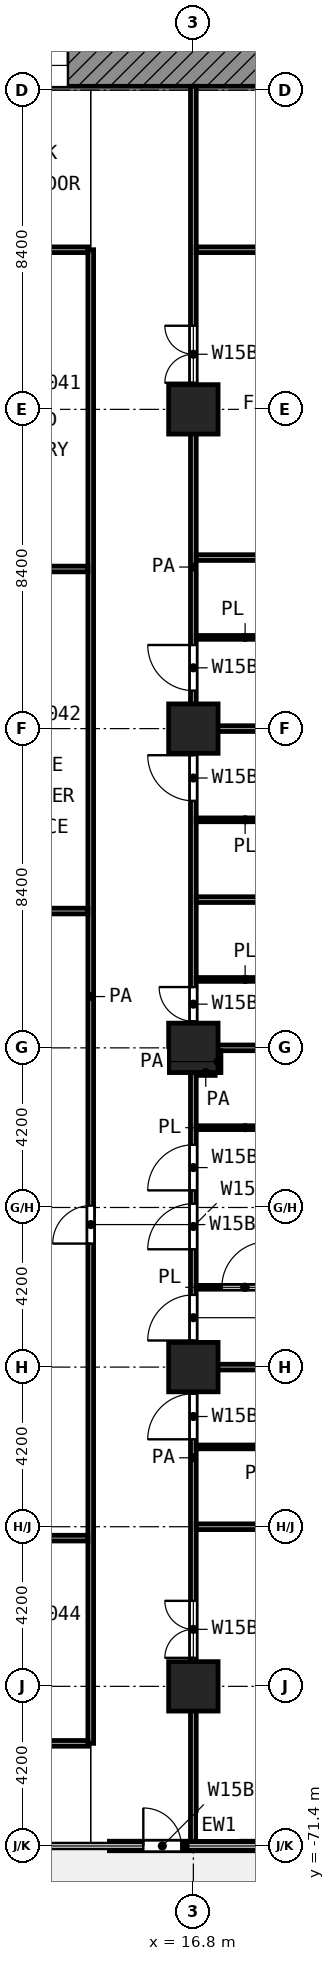
"""IFC4 building model, lengths in metres.
Left out: names, types, materials, properties, quantities, classifications, styles, units other than length and angle.
Written with IfcOpenShell. Run it as: python <this file> out.ifc"""

import sys

from ifc_helpers import new_model, si_unit, direction, frame, frame_2d, origin, origin_2d, place, context, subcontext, project, spatial, rectangle, extrude, element, fill, save


model = new_model("IFC4")
c1 = context("Model", 3, precision=1e-05, world=origin(), true_north=direction((0.0, 1.0)))
c2 = subcontext(c1, "Body", "Model", "MODEL_VIEW")
j1 = project(units=[si_unit("LENGTHUNIT", "METRE"), si_unit("PLANEANGLEUNIT", "RADIAN")], contexts=[c1])
p1 = place(None, origin())
s1 = spatial("IfcSite", under=j1, at=p1, CompositionType="ELEMENT")
p2 = place(p1, origin())
s2 = spatial("IfcBuilding", under=s1, at=p2, CompositionType="ELEMENT")
p3 = place(p2, frame((0.0, 0.0, 85.4)))
s3 = spatial("IfcBuildingStorey", under=s2, at=p3, CompositionType="ELEMENT", Elevation=85.4)
for number, where, z_axis, x_axis in (
    (1, (16.8, -33.6, 0.0), (0.0, 0.0, 1.0), (1.0, 0.0, 0.0)),
    (2, (16.8, -42.0, 0.0), (0.0, 0.0, 1.0), (1.0, 0.0, 0.0)),
    (3, (16.8, -50.4, 0.0), (0.0, 0.0, 1.0), (1.0, 0.0, 0.0)),
    (4, (16.8, -58.8, 0.0), (0.0, 0.0, 1.0), (1.0, 0.0, 0.0)),
    (5, (16.8, -67.2, 0.0), (0.0, 0.0, 1.0), (1.0, 0.0, 0.0)),
):
    element("IfcColumn", number, at=place(p3, frame(where, z_axis=z_axis, x_axis=x_axis)), inside=s3, PredefinedType="COLUMN", context=c2, shape_type="SweptSolid", body=[
        extrude(rectangle(XDim=1.3, YDim=1.3, at=origin_2d()), origin(), (0.0, 0.0, 1.0), 4.2),
    ])
p4 = place(p3, frame((14.592, -71.4, 0.0), z_axis=(0.0, 0.0, 1.0), x_axis=(1.0, 0.0, 0.0)))
e6 = element("IfcWall", 6, at=p4, inside=s3, PredefinedType="SOLIDWALL", context=c2, shape_type="SweptSolid", body=[
    extrude(rectangle(XDim=3.983, YDim=0.25, at=frame_2d((1.992, 0.0))), origin(), (0.0, 0.0, 1.0), 3.78),
])
p5 = place(p4, frame((0.892, 0.0, 0.0)))
e7 = element("IfcOpeningElement", 7, at=p5, cuts=e6, PredefinedType="OPENING", context=c2, shape_type="SweptSolid", body=[
    extrude(rectangle(XDim=1.0, YDim=2.1, at=frame_2d((0.5, 1.05))), frame((0.0, 0.135, 0.0), z_axis=(0.0, -1.0, 0.0), x_axis=(1.0, 0.0, 0.0)), (0.0, 0.0, 1.0), 0.27),
])
p6 = place(p3, frame((5.4, -24.55, 0.0), z_axis=(0.0, 0.0, 1.0), x_axis=(1.0, 0.0, 0.0)))
e8 = element("IfcWall", 8, at=p6, inside=s3, PredefinedType="SHEAR", context=c2, shape_type="SweptSolid", body=[
    extrude(rectangle(XDim=18.6, YDim=1.1, at=frame_2d((9.3, 0.0))), origin(), (0.0, 0.0, 1.0), 3.9),
])
p7 = place(p6, frame((6.3, 0.0, 0.0)))
e9 = element("IfcOpeningElement", 9, at=p7, cuts=e8, PredefinedType="OPENING", context=c2, shape_type="SweptSolid", body=[
    extrude(rectangle(XDim=1.8, YDim=2.1, at=frame_2d((0.9, 1.05))), frame((0.0, 0.56, 0.0), z_axis=(0.0, -1.0, 0.0), x_axis=(1.0, 0.0, 0.0)), (0.0, 0.0, 1.0), 1.12),
])
p8 = place(p3, frame((16.875, -60.9, 0.0), z_axis=(0.0, 0.0, 1.0), x_axis=(1.0, 0.0, 0.0)))
e10 = element("IfcWall", 10, at=p8, inside=s3, PredefinedType="PARTITIONING", context=c2, shape_type="SweptSolid", body=[
    extrude(rectangle(XDim=3.175, YDim=0.1, at=frame_2d((1.587, 0.0))), origin(), (0.0, 0.0, 1.0), 3.9),
])
p9 = place(p3, frame((16.875, -56.7, 0.0), z_axis=(0.0, 0.0, 1.0), x_axis=(1.0, 0.0, 0.0)))
e11 = element("IfcWall", 11, at=p9, inside=s3, PredefinedType="PARTITIONING", context=c2, shape_type="SweptSolid", body=[
    extrude(rectangle(XDim=2.575, YDim=0.1, at=frame_2d((1.288, 0.0))), origin(), (0.0, 0.0, 1.0), 3.9),
])
p10 = place(p9, frame((0.675, 0.0, 0.0)))
e12 = element("IfcOpeningElement", 12, at=p10, cuts=e11, PredefinedType="OPENING", context=c2, shape_type="SweptSolid", body=[
    extrude(rectangle(XDim=1.2, YDim=2.1, at=frame_2d((0.6, 1.05))), frame((0.0, 0.06, 0.0), z_axis=(0.0, -1.0, 0.0), x_axis=(1.0, 0.0, 0.0)), (0.0, 0.0, 1.0), 0.12),
])
for number, where, z_axis, x_axis in (
    (13, (16.875, -52.5, 0.0), (0.0, 0.0, 1.0), (1.0, 0.0, 0.0)),
    (14, (16.875, -48.6, 0.0), (0.0, 0.0, 1.0), (1.0, 0.0, 0.0)),
    (15, (16.875, -44.4, 0.0), (0.0, 0.0, 1.0), (1.0, 0.0, 0.0)),
    (16, (16.875, -39.6, 0.0), (0.0, 0.0, 1.0), (1.0, 0.0, 0.0)),
):
    element("IfcWall", number, at=place(p3, frame(where, z_axis=z_axis, x_axis=x_axis)), inside=s3, PredefinedType="PARTITIONING", context=c2, shape_type="SweptSolid", body=[
        extrude(rectangle(XDim=2.575, YDim=0.1, at=frame_2d((1.288, 0.0))), origin(), (0.0, 0.0, 1.0), 3.9),
    ])
for number, where, z_axis, x_axis in (
    (17, (11.175, -68.7, 0.0), (0.0, 0.0, 1.0), (1.0, 0.0, 0.0)),
    (18, (11.175, -63.3, 0.0), (0.0, 0.0, 1.0), (1.0, 0.0, 0.0)),
):
    element("IfcWall", number, at=place(p3, frame(where, z_axis=z_axis, x_axis=x_axis)), inside=s3, PredefinedType="PARTITIONING", context=c2, shape_type="SweptSolid", body=[
        extrude(rectangle(XDim=2.85, YDim=0.15, at=frame_2d((1.425, 0.0))), origin(), (0.0, 0.0, 1.0), 3.9),
    ])
for number, where, z_axis, x_axis in (
    (19, (16.875, -63.0, 0.0), (0.0, 0.0, 1.0), (1.0, 0.0, 0.0)),
    (20, (16.875, -58.8, 0.0), (0.0, 0.0, 1.0), (1.0, 0.0, 0.0)),
):
    element("IfcWall", number, at=place(p3, frame(where, z_axis=z_axis, x_axis=x_axis)), inside=s3, PredefinedType="PARTITIONING", context=c2, shape_type="SweptSolid", body=[
        extrude(rectangle(XDim=8.245, YDim=0.15, at=frame_2d((4.123, 0.0))), origin(), (0.0, 0.0, 1.0), 3.9),
    ])
p11 = place(p3, frame((16.877, -51.05, 0.0), z_axis=(0.0, 0.0, 1.0), x_axis=(1.0, 0.0, 0.0)))
e21 = element("IfcWall", 21, at=p11, inside=s3, PredefinedType="PARTITIONING", context=c2, shape_type="SweptSolid", body=[
    extrude(rectangle(XDim=0.498, YDim=0.15, at=frame_2d((0.249, 0.0))), origin(), (0.0, 0.0, 1.0), 3.9),
])
p12 = place(p3, frame((16.877, -50.4, 0.0), z_axis=(0.0, 0.0, 1.0), x_axis=(1.0, 0.0, 0.0)))
e22 = element("IfcWall", 22, at=p12, inside=s3, PredefinedType="PARTITIONING", context=c2, shape_type="SweptSolid", body=[
    extrude(rectangle(XDim=8.243, YDim=0.15, at=frame_2d((4.122, 0.0))), origin(), (0.0, 0.0, 1.0), 3.9),
])
p13 = place(p3, frame((11.175, -46.8, 0.0), z_axis=(0.0, 0.0, 1.0), x_axis=(1.0, 0.0, 0.0)))
e23 = element("IfcWall", 23, at=p13, inside=s3, PredefinedType="PARTITIONING", context=c2, shape_type="SweptSolid", body=[
    extrude(rectangle(XDim=2.85, YDim=0.15, at=frame_2d((1.425, 0.0))), origin(), (0.0, 0.0, 1.0), 3.9),
])
for number, where, z_axis, x_axis in (
    (24, (16.875, -46.5, 0.0), (0.0, 0.0, 1.0), (1.0, 0.0, 0.0)),
    (25, (16.875, -42.0, 0.0), (0.0, 0.0, 1.0), (1.0, 0.0, 0.0)),
):
    element("IfcWall", number, at=place(p3, frame(where, z_axis=z_axis, x_axis=x_axis)), inside=s3, PredefinedType="PARTITIONING", context=c2, shape_type="SweptSolid", body=[
        extrude(rectangle(XDim=8.245, YDim=0.15, at=frame_2d((4.123, 0.0))), origin(), (0.0, 0.0, 1.0), 3.9),
    ])
p14 = place(p3, frame((11.175, -37.8, 0.0), z_axis=(0.0, 0.0, 1.0), x_axis=(1.0, 0.0, 0.0)))
e26 = element("IfcWall", 26, at=p14, inside=s3, PredefinedType="PARTITIONING", context=c2, shape_type="SweptSolid", body=[
    extrude(rectangle(XDim=2.85, YDim=0.15, at=frame_2d((1.425, 0.0))), origin(), (0.0, 0.0, 1.0), 3.9),
])
p15 = place(p3, frame((16.875, -37.5, 0.0), z_axis=(0.0, 0.0, 1.0), x_axis=(1.0, 0.0, 0.0)))
e27 = element("IfcWall", 27, at=p15, inside=s3, PredefinedType="PARTITIONING", context=c2, shape_type="SweptSolid", body=[
    extrude(rectangle(XDim=8.245, YDim=0.15, at=frame_2d((4.123, 0.0))), origin(), (0.0, 0.0, 1.0), 3.9),
])
p16 = place(p3, frame((11.175, -29.4, 0.0), z_axis=(0.0, 0.0, 1.0), x_axis=(1.0, 0.0, 0.0)))
e28 = element("IfcWall", 28, at=p16, inside=s3, PredefinedType="PARTITIONING", context=c2, shape_type="SweptSolid", body=[
    extrude(rectangle(XDim=2.85, YDim=0.15, at=frame_2d((1.425, 0.0))), origin(), (0.0, 0.0, 1.0), 3.9),
])
p17 = place(p3, frame((16.875, -29.4, 0.0), z_axis=(0.0, 0.0, 1.0), x_axis=(1.0, 0.0, 0.0)))
e29 = element("IfcWall", 29, at=p17, inside=s3, PredefinedType="PARTITIONING", context=c2, shape_type="SweptSolid", body=[
    extrude(rectangle(XDim=8.25, YDim=0.15, at=frame_2d((4.125, 0.0))), origin(), (0.0, 0.0, 1.0), 3.9),
])
p18 = place(p3, frame((14.1, -68.7, 0.0), z_axis=(0.0, 0.0, 1.0), x_axis=(0.0, 1.0, 0.0)))
e30 = element("IfcWall", 30, at=p18, inside=s3, PredefinedType="PARTITIONING", context=c2, shape_type="SweptSolid", body=[
    extrude(rectangle(XDim=39.3, YDim=0.15, at=frame_2d((19.65, 0.0))), origin(), (0.0, 0.0, 1.0), 3.9),
])
p19 = place(p18, frame((13.15, 0.0, 0.0)))
e31 = element("IfcOpeningElement", 31, at=p19, cuts=e30, PredefinedType="OPENING", context=c2, shape_type="SweptSolid", body=[
    extrude(rectangle(XDim=1.0, YDim=2.1, at=frame_2d((0.5, 1.05))), frame((0.0, 0.085, 0.0), z_axis=(0.0, -1.0, 0.0), x_axis=(1.0, 0.0, 0.0)), (0.0, 0.0, 1.0), 0.17),
])
p20 = place(p3, frame((16.8, -71.32, 0.0), z_axis=(0.0, 0.0, 1.0), x_axis=(0.0, 1.0, 0.0)))
e32 = element("IfcWall", 32, at=p20, inside=s3, PredefinedType="PARTITIONING", context=c2, shape_type="SweptSolid", body=[
    extrude(rectangle(XDim=20.268, YDim=0.15, at=frame_2d((10.134, 0.0))), origin(), (0.0, 0.0, 1.0), 3.9),
])
p21 = place(p20, frame((17.17, 0.0, 0.0)))
e33 = element("IfcOpeningElement", 33, at=p21, cuts=e32, PredefinedType="OPENING", context=c2, shape_type="SweptSolid", body=[
    extrude(rectangle(XDim=1.2, YDim=2.1, at=frame_2d((0.6, 1.05))), frame((0.0, 0.085, 0.0), z_axis=(0.0, -1.0, 0.0), x_axis=(1.0, 0.0, 0.0)), (0.0, 0.0, 1.0), 0.17),
])
p22 = place(p20, frame((15.62, 0.0, 0.0)))
e34 = element("IfcOpeningElement", 34, at=p22, cuts=e32, PredefinedType="OPENING", context=c2, shape_type="SweptSolid", body=[
    extrude(rectangle(XDim=1.2, YDim=2.1, at=frame_2d((0.6, 1.05))), frame((0.0, 0.085, 0.0), z_axis=(0.0, -1.0, 0.0), x_axis=(1.0, 0.0, 0.0)), (0.0, 0.0, 1.0), 0.17),
])
p23 = place(p20, frame((13.22, 0.0, 0.0)))
e35 = element("IfcOpeningElement", 35, at=p23, cuts=e32, PredefinedType="OPENING", context=c2, shape_type="SweptSolid", body=[
    extrude(rectangle(XDim=1.2, YDim=2.1, at=frame_2d((0.6, 1.05))), frame((0.0, 0.085, 0.0), z_axis=(0.0, -1.0, 0.0), x_axis=(1.0, 0.0, 0.0)), (0.0, 0.0, 1.0), 0.17),
])
p24 = place(p20, frame((10.62, 0.0, 0.0)))
e36 = element("IfcOpeningElement", 36, at=p24, cuts=e32, PredefinedType="OPENING", context=c2, shape_type="SweptSolid", body=[
    extrude(rectangle(XDim=1.2, YDim=2.1, at=frame_2d((0.6, 1.05))), frame((0.0, 0.085, 0.0), z_axis=(0.0, -1.0, 0.0), x_axis=(1.0, 0.0, 0.0)), (0.0, 0.0, 1.0), 0.17),
])
p25 = place(p20, frame((4.87, 0.0, 0.0)))
e37 = element("IfcOpeningElement", 37, at=p25, cuts=e32, PredefinedType="OPENING", context=c2, shape_type="SweptSolid", body=[
    extrude(rectangle(XDim=1.5, YDim=2.1, at=frame_2d((0.75, 1.05))), frame((0.0, 0.085, 0.0), z_axis=(0.0, -1.0, 0.0), x_axis=(1.0, 0.0, 0.0)), (0.0, 0.0, 1.0), 0.17),
])
p26 = place(p3, frame((16.8, -50.398, 0.0), z_axis=(0.0, 0.0, 1.0), x_axis=(0.0, 1.0, 0.0)))
e38 = element("IfcWall", 38, at=p26, inside=s3, PredefinedType="PARTITIONING", context=c2, shape_type="SweptSolid", body=[
    extrude(rectangle(XDim=25.298, YDim=0.15, at=frame_2d((12.649, 0.0))), origin(), (0.0, 0.0, 1.0), 3.9),
])
p27 = place(p26, frame((17.498, 0.0, 0.0)))
e39 = element("IfcOpeningElement", 39, at=p27, cuts=e38, PredefinedType="OPENING", context=c2, shape_type="SweptSolid", body=[
    extrude(rectangle(XDim=1.5, YDim=2.1, at=frame_2d((0.75, 1.05))), frame((0.0, 0.085, 0.0), z_axis=(0.0, -1.0, 0.0), x_axis=(1.0, 0.0, 0.0)), (0.0, 0.0, 1.0), 0.17),
])
p28 = place(p26, frame((9.398, 0.0, 0.0)))
e40 = element("IfcOpeningElement", 40, at=p28, cuts=e38, PredefinedType="OPENING", context=c2, shape_type="SweptSolid", body=[
    extrude(rectangle(XDim=1.2, YDim=2.1, at=frame_2d((0.6, 1.05))), frame((0.0, 0.085, 0.0), z_axis=(0.0, -1.0, 0.0), x_axis=(1.0, 0.0, 0.0)), (0.0, 0.0, 1.0), 0.17),
])
p29 = place(p26, frame((6.498, 0.0, 0.0)))
e41 = element("IfcOpeningElement", 41, at=p29, cuts=e38, PredefinedType="OPENING", context=c2, shape_type="SweptSolid", body=[
    extrude(rectangle(XDim=1.2, YDim=2.1, at=frame_2d((0.6, 1.05))), frame((0.0, 0.085, 0.0), z_axis=(0.0, -1.0, 0.0), x_axis=(1.0, 0.0, 0.0)), (0.0, 0.0, 1.0), 0.17),
])
p30 = place(p26, frame((0.698, 0.0, 0.0)))
e42 = element("IfcOpeningElement", 42, at=p30, cuts=e38, PredefinedType="OPENING", context=c2, shape_type="SweptSolid", body=[
    extrude(rectangle(XDim=0.9, YDim=2.1, at=frame_2d((0.45, 1.05))), frame((0.0, 0.085, 0.0), z_axis=(0.0, -1.0, 0.0), x_axis=(1.0, 0.0, 0.0)), (0.0, 0.0, 1.0), 0.17),
])
p31 = place(p3, frame((17.45, -51.05, 0.0), z_axis=(0.0, 0.0, 1.0), x_axis=(0.0, 1.0, 0.0)))
e43 = element("IfcWall", 43, at=p31, inside=s3, PredefinedType="PARTITIONING", context=c2, shape_type="SweptSolid", body=[
    extrude(rectangle(XDim=0.575, YDim=0.15, at=frame_2d((0.288, 0.0))), origin(), (0.0, 0.0, 1.0), 3.9),
])
p32 = place(p5, origin())
e44 = element("IfcDoor", 44, at=p32, inside=s3, OperationType="SINGLE_SWING_LEFT", PredefinedType="DOOR", context=c2, shape_type="SweptSolid", body=[
    extrude(rectangle(XDim=1.0, YDim=2.1, at=frame_2d((0.5, 1.05))), frame((0.0, 0.025, 0.0), z_axis=(0.0, -1.0, 0.0), x_axis=(1.0, 0.0, 0.0)), (0.0, 0.0, 1.0), 0.05),
])
fill(e7, e44)
p33 = place(p7, origin())
e45 = element("IfcDoor", 45, at=p33, inside=s3, OperationType="DOUBLE_DOOR_SINGLE_SWING", PredefinedType="DOOR", context=c2, shape_type="SweptSolid", body=[
    extrude(rectangle(XDim=1.8, YDim=2.1, at=frame_2d((0.9, 1.05))), frame((0.0, 0.025, 0.0), z_axis=(0.0, -1.0, 0.0), x_axis=(1.0, 0.0, 0.0)), (0.0, 0.0, 1.0), 0.05),
])
fill(e9, e45)
p34 = place(p19, origin())
e46 = element("IfcDoor", 46, at=p34, inside=s3, OperationType="SINGLE_SWING_LEFT", PredefinedType="DOOR", context=c2, shape_type="SweptSolid", body=[
    extrude(rectangle(XDim=1.0, YDim=2.1, at=frame_2d((0.5, 1.05))), frame((0.0, 0.025, 0.0), z_axis=(0.0, -1.0, 0.0), x_axis=(1.0, 0.0, 0.0)), (0.0, 0.0, 1.0), 0.05),
])
fill(e31, e46)
p35 = place(p27, origin())
e47 = element("IfcDoor", 47, at=p35, inside=s3, OperationType="DOUBLE_DOOR_SINGLE_SWING", PredefinedType="DOOR", context=c2, shape_type="SweptSolid", body=[
    extrude(rectangle(XDim=1.5, YDim=2.1, at=frame_2d((0.75, 1.05))), frame((0.0, 0.025, 0.0), z_axis=(0.0, -1.0, 0.0), x_axis=(1.0, 0.0, 0.0)), (0.0, 0.0, 1.0), 0.05),
])
fill(e39, e47)
p36 = place(p28, origin())
e48 = element("IfcDoor", 48, at=p36, inside=s3, OperationType="SINGLE_SWING_RIGHT", PredefinedType="DOOR", context=c2, shape_type="SweptSolid", body=[
    extrude(rectangle(XDim=1.2, YDim=2.1, at=frame_2d((0.6, 1.05))), frame((0.0, 0.025, 0.0), z_axis=(0.0, -1.0, 0.0), x_axis=(1.0, 0.0, 0.0)), (0.0, 0.0, 1.0), 0.05),
])
fill(e40, e48)
p37 = place(p29, origin())
e49 = element("IfcDoor", 49, at=p37, inside=s3, OperationType="SINGLE_SWING_RIGHT", PredefinedType="DOOR", context=c2, shape_type="SweptSolid", body=[
    extrude(rectangle(XDim=1.2, YDim=2.1, at=frame_2d((0.6, 1.05))), frame((0.0, 0.025, 0.0), z_axis=(0.0, -1.0, 0.0), x_axis=(1.0, 0.0, 0.0)), (0.0, 0.0, 1.0), 0.05),
])
fill(e41, e49)
p38 = place(p30, origin())
e50 = element("IfcDoor", 50, at=p38, inside=s3, OperationType="SINGLE_SWING_RIGHT", PredefinedType="DOOR", context=c2, shape_type="SweptSolid", body=[
    extrude(rectangle(XDim=0.9, YDim=2.1, at=frame_2d((0.45, 1.05))), frame((0.0, 0.025, 0.0), z_axis=(0.0, -1.0, 0.0), x_axis=(1.0, 0.0, 0.0)), (0.0, 0.0, 1.0), 0.05),
])
fill(e42, e50)
p39 = place(p21, origin())
e51 = element("IfcDoor", 51, at=p39, inside=s3, OperationType="SINGLE_SWING_LEFT", PredefinedType="DOOR", context=c2, shape_type="SweptSolid", body=[
    extrude(rectangle(XDim=1.2, YDim=2.1, at=frame_2d((0.6, 1.05))), frame((0.0, 0.025, 0.0), z_axis=(0.0, -1.0, 0.0), x_axis=(1.0, 0.0, 0.0)), (0.0, 0.0, 1.0), 0.05),
])
fill(e33, e51)
p40 = place(p22, origin())
e52 = element("IfcDoor", 52, at=p40, inside=s3, OperationType="SINGLE_SWING_LEFT", PredefinedType="DOOR", context=c2, shape_type="SweptSolid", body=[
    extrude(rectangle(XDim=1.2, YDim=2.1, at=frame_2d((0.6, 1.05))), frame((0.0, 0.025, 0.0), z_axis=(0.0, -1.0, 0.0), x_axis=(1.0, 0.0, 0.0)), (0.0, 0.0, 1.0), 0.05),
])
fill(e34, e52)
p41 = place(p23, origin())
e53 = element("IfcDoor", 53, at=p41, inside=s3, OperationType="SINGLE_SWING_LEFT", PredefinedType="DOOR", context=c2, shape_type="SweptSolid", body=[
    extrude(rectangle(XDim=1.2, YDim=2.1, at=frame_2d((0.6, 1.05))), frame((0.0, 0.025, 0.0), z_axis=(0.0, -1.0, 0.0), x_axis=(1.0, 0.0, 0.0)), (0.0, 0.0, 1.0), 0.05),
])
fill(e35, e53)
p42 = place(p10, origin())
e54 = element("IfcDoor", 54, at=p42, inside=s3, OperationType="SINGLE_SWING_RIGHT", PredefinedType="DOOR", context=c2, shape_type="SweptSolid", body=[
    extrude(rectangle(XDim=1.2, YDim=2.1, at=frame_2d((0.6, 1.05))), frame((0.0, 0.025, 0.0), z_axis=(0.0, -1.0, 0.0), x_axis=(1.0, 0.0, 0.0)), (0.0, 0.0, 1.0), 0.05),
])
fill(e12, e54)
p43 = place(p24, origin())
e55 = element("IfcDoor", 55, at=p43, inside=s3, OperationType="SINGLE_SWING_LEFT", PredefinedType="DOOR", context=c2, shape_type="SweptSolid", body=[
    extrude(rectangle(XDim=1.2, YDim=2.1, at=frame_2d((0.6, 1.05))), frame((0.0, 0.025, 0.0), z_axis=(0.0, -1.0, 0.0), x_axis=(1.0, 0.0, 0.0)), (0.0, 0.0, 1.0), 0.05),
])
fill(e36, e55)
p44 = place(p25, origin())
e56 = element("IfcDoor", 56, at=p44, inside=s3, OperationType="DOUBLE_DOOR_SINGLE_SWING", PredefinedType="DOOR", context=c2, shape_type="SweptSolid", body=[
    extrude(rectangle(XDim=1.5, YDim=2.1, at=frame_2d((0.75, 1.05))), frame((0.0, 0.025, 0.0), z_axis=(0.0, -1.0, 0.0), x_axis=(1.0, 0.0, 0.0)), (0.0, 0.0, 1.0), 0.05),
])
fill(e37, e56)
save(model, sys.argv[1])
